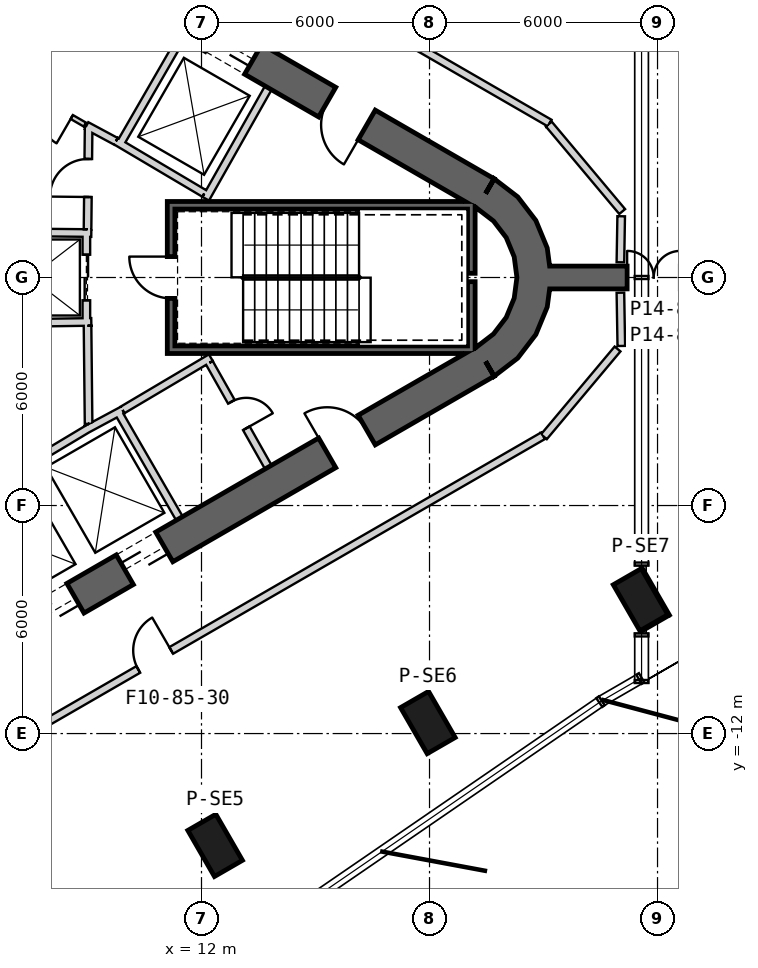
"""IFC4 building model, lengths in metres.
Left out: names, types, materials, properties, quantities, classifications, styles, units other than length and angle.
Written with IfcOpenShell. Run it as: python <this file> out.ifc"""

import sys

from ifc_helpers import new_model, si_unit, direction, frame, frame_2d, origin, origin_2d, place, context, subcontext, project, spatial, polyline, rectangle, outline, extrude, element, fill, save


model = new_model("IFC4")
c1 = context("Model", 3, precision=1e-05, world=origin(), true_north=direction((0.0, 1.0)))
c2 = subcontext(c1, "Body", "Model", "MODEL_VIEW")
j1 = project(units=[si_unit("LENGTHUNIT", "METRE"), si_unit("PLANEANGLEUNIT", "RADIAN")], contexts=[c1])
p1 = place(None, origin())
s1 = spatial("IfcSite", under=j1, at=p1, CompositionType="ELEMENT")
p2 = place(p1, origin())
s2 = spatial("IfcBuilding", under=s1, at=p2, CompositionType="ELEMENT")
p3 = place(p2, frame((0.0, 0.0, 368.9)))
s3 = spatial("IfcBuildingStorey", under=s2, at=p3, CompositionType="ELEMENT", Elevation=368.9)
for number, where, z_axis, x_axis in (
    (1, (12.359, -14.942, 0.0), (0.0, 0.0, 1.0), (0.5, -0.866, 0.0)),
    (2, (17.957, -11.71, 0.0), (0.0, 0.0, 1.0), (0.5, -0.866, 0.0)),
    (3, (23.555, -8.479, 0.0), (0.0, 0.0, 1.0), (0.5, -0.866, 0.0)),
):
    element("IfcColumn", number, at=place(p3, frame(where, z_axis=z_axis, x_axis=x_axis)), inside=s3, PredefinedType="COLUMN", context=c2, shape_type="SweptSolid", body=[
        extrude(rectangle(XDim=1.4, YDim=0.85, at=origin_2d()), origin(), (0.0, 0.0, 1.0), 3.9),
    ])
p4 = place(p3, frame((19.475, 2.208, 0.0), z_axis=(0.0, 0.0, 1.0), x_axis=(-0.866028369851, 0.499994862586, 0.0)))
e4 = element("IfcWall", 4, at=p4, inside=s3, PredefinedType="SHEAR", context=c2, shape_type="SweptSolid", body=[
    extrude(rectangle(XDim=31.523, YDim=0.9, at=frame_2d((15.762, 0.0))), origin(), (0.0, 0.0, 1.0), 3.9),
])
p5 = place(p4, frame((7.062, 0.0, 0.0)))
e5 = element("IfcOpeningElement", 5, at=p5, cuts=e4, PredefinedType="OPENING", context=c2, shape_type="SweptSolid", body=[
    extrude(rectangle(XDim=1.2, YDim=2.4, at=frame_2d((0.6, 1.2))), frame((0.0, 0.46, 0.0), z_axis=(0.0, -1.0, 0.0), x_axis=(1.0, 0.0, 0.0)), (0.0, 0.0, 1.0), 0.92),
])
p6 = place(p4, frame((3.612, 0.0, 0.0)))
e6 = element("IfcOpeningElement", 6, at=p6, cuts=e4, PredefinedType="OPENING", context=c2, shape_type="SweptSolid", body=[
    extrude(rectangle(XDim=1.2, YDim=2.4, at=frame_2d((0.6, 1.2))), frame((0.0, 0.46, 0.0), z_axis=(0.0, -1.0, 0.0), x_axis=(1.0, 0.0, 0.0)), (0.0, 0.0, 1.0), 0.92),
])
p7 = place(p4, frame((26.712, 0.0, 0.0)))
e7 = element("IfcOpeningElement", 7, at=p7, cuts=e4, PredefinedType="OPENING", context=c2, shape_type="SweptSolid", body=[
    extrude(rectangle(XDim=1.2, YDim=2.4, at=frame_2d((0.6, 1.2))), frame((0.0, 0.46, 0.0), z_axis=(0.0, -1.0, 0.0), x_axis=(1.0, 0.0, 0.0)), (0.0, 0.0, 1.0), 0.92),
])
p8 = place(p3, frame((-7.825, -17.97, 0.0), z_axis=(0.0, 0.0, 1.0), x_axis=(0.866028369851, 0.499994862586, 0.0)))
e8 = element("IfcWall", 8, at=p8, inside=s3, PredefinedType="SHEAR", context=c2, shape_type="SweptSolid", body=[
    extrude(rectangle(XDim=31.523, YDim=0.9, at=frame_2d((15.762, 0.0))), origin(), (0.0, 0.0, 1.0), 3.9),
])
p9 = place(p8, frame((17.862, 0.0, 0.0)))
e9 = element("IfcOpeningElement", 9, at=p9, cuts=e8, PredefinedType="OPENING", context=c2, shape_type="SweptSolid", body=[
    extrude(rectangle(XDim=1.2, YDim=2.4, at=frame_2d((0.6, 1.2))), frame((0.0, 0.46, 0.0), z_axis=(0.0, -1.0, 0.0), x_axis=(1.0, 0.0, 0.0)), (0.0, 0.0, 1.0), 0.92),
])
p10 = place(p8, frame((20.562, 0.0, 0.0)))
e10 = element("IfcOpeningElement", 10, at=p10, cuts=e8, PredefinedType="OPENING", context=c2, shape_type="SweptSolid", body=[
    extrude(rectangle(XDim=1.2, YDim=2.4, at=frame_2d((0.6, 1.2))), frame((0.0, 0.46, 0.0), z_axis=(0.0, -1.0, 0.0), x_axis=(1.0, 0.0, 0.0)), (0.0, 0.0, 1.0), 0.92),
])
p11 = place(p8, frame((26.712, 0.0, 0.0)))
e11 = element("IfcOpeningElement", 11, at=p11, cuts=e8, PredefinedType="OPENING", context=c2, shape_type="SweptSolid", body=[
    extrude(rectangle(XDim=1.2, YDim=2.4, at=frame_2d((0.6, 1.2))), frame((0.0, 0.46, 0.0), z_axis=(0.0, -1.0, 0.0), x_axis=(1.0, 0.0, 0.0)), (0.0, 0.0, 1.0), 0.92),
])
p12 = place(p8, frame((3.612, 0.0, 0.0)))
e12 = element("IfcOpeningElement", 12, at=p12, cuts=e8, PredefinedType="OPENING", context=c2, shape_type="SweptSolid", body=[
    extrude(rectangle(XDim=1.2, YDim=2.4, at=frame_2d((0.6, 1.2))), frame((0.0, 0.46, 0.0), z_axis=(0.0, -1.0, 0.0), x_axis=(1.0, 0.0, 0.0)), (0.0, 0.0, 1.0), 0.92),
])
p13 = place(p3, origin())
e13 = element("IfcWall", 13, at=p13, inside=s3, PredefinedType="SHEAR", context=c2, shape_type="SweptSolid", body=[
    extrude(outline(polyline([(19.7, -2.598), (20.321, -2.121), (20.798, -1.5), (21.098, -0.777), (21.2, 0.0), (21.098, 0.777), (20.798, 1.5), (20.321, 2.121), (19.7, 2.598), (19.25, 1.819), (19.685, 1.485), (20.019, 1.05), (20.229, 0.543), (20.3, 0.0), (20.229, -0.543), (20.019, -1.05), (19.685, -1.485), (19.25, -1.819), (19.7, -2.598)])), origin(), (0.0, 0.0, 1.0), 3.9),
])
p14 = place(p3, frame((21.15, 0.0, 0.0), z_axis=(0.0, 0.0, 1.0), x_axis=(1.0, 0.0, 0.0)))
e14 = element("IfcWall", 14, at=p14, inside=s3, PredefinedType="SHEAR", context=c2, shape_type="SweptSolid", body=[
    extrude(rectangle(XDim=6.921, YDim=0.6, at=frame_2d((3.461, 0.0))), origin(), (0.0, 0.0, 1.0), 3.9),
])
p15 = place(p14, frame((1.7, 0.0, 0.0)))
e15 = element("IfcOpeningElement", 15, at=p15, cuts=e14, PredefinedType="OPENING", context=c2, shape_type="SweptSolid", body=[
    extrude(rectangle(XDim=1.4, YDim=2.4, at=frame_2d((0.7, 1.2))), frame((0.0, 0.31, 0.0), z_axis=(0.0, -1.0, 0.0), x_axis=(1.0, 0.0, 0.0)), (0.0, 0.0, 1.0), 0.62),
])
p16 = place(p3, frame((23.569, -7.593, 0.0), z_axis=(0.0, 0.0, 1.0), x_axis=(0.499991248344, -0.866030456496, 0.0)))
e16 = element("IfcWall", 16, at=p16, inside=s3, PredefinedType="SOLIDWALL", context=c2, shape_type="SweptSolid", body=[
    extrude(rectangle(XDim=1.52, YDim=0.06, at=frame_2d((0.76, 0.0))), origin(), (0.0, 0.0, 1.0), 2.61),
])
p17 = place(p3, frame((23.552, -9.323, 0.0), z_axis=(0.0, 0.0, 1.0), x_axis=(0.866061263272, 0.499937884402, 0.0)))
e17 = element("IfcWall", 17, at=p17, inside=s3, PredefinedType="SOLIDWALL", context=c2, shape_type="SweptSolid", body=[
    extrude(rectangle(XDim=0.85, YDim=0.06, at=frame_2d((0.425, 0.0))), origin(), (0.0, 0.0, 1.0), 3.21),
])
p18 = place(p3, frame((9.847, 3.495, 0.0), z_axis=(0.0, 0.0, 1.0), x_axis=(0.499984717929, 0.866034226713, 0.0)))
e18 = element("IfcWall", 18, at=p18, inside=s3, PredefinedType="PLUMBINGWALL", context=c2, shape_type="SweptSolid", body=[
    extrude(rectangle(XDim=3.25, YDim=0.2, at=frame_2d((1.625, 0.0))), origin(), (0.0, 0.0, 1.0), 3.6),
])
p19 = place(p3, frame((12.11, 2.073, 0.0), z_axis=(0.0, 0.0, 1.0), x_axis=(0.49196600604, 0.870614408852, 0.0)))
e19 = element("IfcWall", 19, at=p19, inside=s3, PredefinedType="PLUMBINGWALL", context=c2, shape_type="SweptSolid", body=[
    extrude(rectangle(XDim=3.35, YDim=0.2, at=frame_2d((1.675, 0.0))), origin(), (0.0, 0.0, 1.0), 3.6),
])
p20 = place(p3, frame((12.073, 2.211, 0.0), z_axis=(0.0, 0.0, 1.0), x_axis=(-0.860414880418, 0.509594185166, 0.0)))
e20 = element("IfcWall", 20, at=p20, inside=s3, PredefinedType="PLUMBINGWALL", context=c2, shape_type="SweptSolid", body=[
    extrude(rectangle(XDim=2.7, YDim=0.2, at=frame_2d((1.35, 0.0))), origin(), (0.0, 0.0, 1.0), 3.6),
])
p21 = place(p3, frame((9.795, -3.525, 0.0), z_axis=(0.0, 0.0, 1.0), x_axis=(0.499984717929, -0.866034226713, 0.0)))
e21 = element("IfcWall", 21, at=p21, inside=s3, PredefinedType="PLUMBINGWALL", context=c2, shape_type="SweptSolid", body=[
    extrude(rectangle(XDim=3.25, YDim=0.2, at=frame_2d((1.625, 0.0))), origin(), (0.0, 0.0, 1.0), 3.6),
])
p22 = place(p3, frame((8.974, -3.999, 0.0), z_axis=(0.0, 0.0, 1.0), x_axis=(0.880907015104, 0.473289373154, 0.0)))
e22 = element("IfcWall", 22, at=p22, inside=s3, PredefinedType="PLUMBINGWALL", context=c2, shape_type="SweptSolid", body=[
    extrude(rectangle(XDim=1.078, YDim=0.2, at=frame_2d((0.539, 0.0))), origin(), (0.0, 0.0, 1.0), 3.6),
])
p23 = place(p3, frame((7.493, -4.878, 0.0), z_axis=(0.0, 0.0, 1.0), x_axis=(0.859981807212, 0.510324691999, 0.0)))
e23 = element("IfcWall", 23, at=p23, inside=s3, PredefinedType="PLUMBINGWALL", context=c2, shape_type="SweptSolid", body=[
    extrude(rectangle(XDim=1.845, YDim=0.2, at=frame_2d((0.922, 0.0))), origin(), (0.0, 0.0, 1.0), 3.6),
])
p24 = place(p3, frame((19.2, 1.9, -0.3), z_axis=(0.0, 0.0, 1.0), x_axis=(-1.0, 0.0, 0.0)))
e24 = element("IfcWall", 24, at=p24, inside=s3, PredefinedType="SHEAR", context=c2, shape_type="SweptSolid", body=[
    extrude(rectangle(XDim=8.1, YDim=0.2, at=frame_2d((4.05, 0.0))), origin(), (0.0, 0.0, 1.0), 3.9),
])
p25 = place(p3, frame((19.1, -2.0, -0.3), z_axis=(0.0, 0.0, 1.0), x_axis=(0.0, 1.0, 0.0)))
e25 = element("IfcWall", 25, at=p25, inside=s3, PredefinedType="SHEAR", context=c2, shape_type="SweptSolid", body=[
    extrude(rectangle(XDim=1.89, YDim=0.2, at=frame_2d((0.945, 0.0))), origin(), (0.0, 0.0, 1.0), 3.9),
])
p26 = place(p3, frame((19.1, 0.11, -0.3), z_axis=(0.0, 0.0, 1.0), x_axis=(0.0, 1.0, 0.0)))
e26 = element("IfcWall", 26, at=p26, inside=s3, PredefinedType="SHEAR", context=c2, shape_type="SweptSolid", body=[
    extrude(rectangle(XDim=1.69, YDim=0.2, at=frame_2d((0.845, 0.0))), origin(), (0.0, 0.0, 1.0), 3.9),
])
p27 = place(p3, frame((11.1, -1.9, -0.3), z_axis=(0.0, 0.0, 1.0), x_axis=(1.0, 0.0, 0.0)))
e27 = element("IfcWall", 27, at=p27, inside=s3, PredefinedType="SHEAR", context=c2, shape_type="SweptSolid", body=[
    extrude(rectangle(XDim=7.9, YDim=0.2, at=frame_2d((3.95, 0.0))), origin(), (0.0, 0.0, 1.0), 3.9),
])
p28 = place(p3, frame((11.2, -1.8, -0.3), z_axis=(0.0, 0.0, 1.0), x_axis=(0.0, 1.0, 0.0)))
e28 = element("IfcWall", 28, at=p28, inside=s3, PredefinedType="SHEAR", context=c2, shape_type="SweptSolid", body=[
    extrude(rectangle(XDim=3.6, YDim=0.2, at=frame_2d((1.8, 0.0))), origin(), (0.0, 0.0, 1.0), 3.9),
])
p29 = place(p28, frame((1.25, 0.0, 0.3)))
e29 = element("IfcOpeningElement", 29, at=p29, cuts=e28, PredefinedType="OPENING", context=c2, shape_type="SweptSolid", body=[
    extrude(rectangle(XDim=1.1, YDim=2.1, at=frame_2d((0.55, 1.05))), frame((0.0, 0.11, 0.0), z_axis=(0.0, -1.0, 0.0), x_axis=(1.0, 0.0, 0.0)), (0.0, 0.0, 1.0), 0.22),
])
p30 = place(p3, frame((8.97, 1.2, 0.0), z_axis=(0.0, 0.0, 1.0), x_axis=(0.0, -1.0, 0.0)))
e30 = element("IfcWall", 30, at=p30, inside=s3, PredefinedType="PLUMBINGWALL", context=c2, shape_type="SweptSolid", body=[
    extrude(rectangle(XDim=2.4, YDim=0.2, at=frame_2d((1.2, 0.0))), origin(), (0.0, 0.0, 1.0), 3.6),
])
p31 = place(p30, frame((0.6, 0.0, 0.0)))
e31 = element("IfcOpeningElement", 31, at=p31, cuts=e30, PredefinedType="OPENING", context=c2, shape_type="SweptSolid", body=[
    extrude(rectangle(XDim=1.2, YDim=2.4, at=frame_2d((0.6, 1.2))), frame((0.0, 0.11, 0.0), z_axis=(0.0, -1.0, 0.0), x_axis=(1.0, 0.0, 0.0)), (0.0, 0.0, 1.0), 0.22),
])
p32 = place(p3, frame((6.0, 1.2, 0.0), z_axis=(0.0, 0.0, 1.0), x_axis=(0.999949988, -0.010001074852, 0.0)))
e32 = element("IfcWall", 32, at=p32, inside=s3, PredefinedType="PLUMBINGWALL", context=c2, shape_type="SweptSolid", body=[
    extrude(rectangle(XDim=3.1, YDim=0.2, at=frame_2d((1.55, 0.0))), origin(), (0.0, 0.0, 1.0), 3.6),
])
p33 = place(p3, frame((5.9, -1.201, 0.0), z_axis=(0.0, 0.0, 1.0), x_axis=(0.999950064753, 0.009993397809, 0.0)))
e33 = element("IfcWall", 33, at=p33, inside=s3, PredefinedType="PLUMBINGWALL", context=c2, shape_type="SweptSolid", body=[
    extrude(rectangle(XDim=3.2, YDim=0.2, at=frame_2d((1.6, 0.0))), origin(), (0.0, 0.0, 1.0), 3.6),
])
p34 = place(p3, frame((8.974, 3.999, 0.0), z_axis=(0.0, 0.0, 1.0), x_axis=(0.880917147855, -0.473270513147, 0.0)))
e34 = element("IfcWall", 34, at=p34, inside=s3, PredefinedType="PARTITIONING", context=c2, shape_type="SweptSolid", body=[
    extrude(rectangle(XDim=0.878, YDim=0.2, at=frame_2d((0.439, 0.0))), origin(), (0.0, 0.0, 1.0), 3.6),
])
p35 = place(p3, frame((8.931, 4.025, 0.0), z_axis=(0.0, 0.0, 1.0), x_axis=(-0.862666884027, 0.505772525157, 0.0)))
e35 = element("IfcWall", 35, at=p35, inside=s3, PredefinedType="PLUMBINGWALL", context=c2, shape_type="SweptSolid", body=[
    extrude(rectangle(XDim=4.372, YDim=0.15, at=frame_2d((2.186, 0.0))), origin(), (0.0, 0.0, 1.0), 3.6),
])
p36 = place(p3, frame((12.245, -2.109, 0.0), z_axis=(0.0, 0.0, 1.0), x_axis=(-0.860414880418, -0.509594185166, 0.0)))
e36 = element("IfcWall", 36, at=p36, inside=s3, PredefinedType="PARTITIONING", context=c2, shape_type="SweptSolid", body=[
    extrude(rectangle(XDim=2.7, YDim=0.2, at=frame_2d((1.35, 0.0))), origin(), (0.0, 0.0, 1.0), 3.6),
])
p37 = place(p3, frame((13.758, -4.99, 0.0), z_axis=(0.0, 0.0, 1.0), x_axis=(-0.491993409184, 0.87059892334, 0.0)))
e37 = element("IfcWall", 37, at=p37, inside=s3, PredefinedType="PARTITIONING", context=c2, shape_type="SweptSolid", body=[
    extrude(rectangle(XDim=3.15, YDim=0.2, at=frame_2d((1.575, 0.0))), origin(), (0.0, 0.0, 1.0), 3.6),
])
p38 = place(p37, frame((1.175, 0.0, 0.0)))
e38 = element("IfcOpeningElement", 38, at=p38, cuts=e37, PredefinedType="OPENING", context=c2, shape_type="SweptSolid", body=[
    extrude(rectangle(XDim=0.8, YDim=2.1, at=frame_2d((0.4, 1.05))), frame((0.0, 0.11, 0.0), z_axis=(0.0, -1.0, 0.0), x_axis=(1.0, 0.0, 0.0)), (0.0, 0.0, 1.0), 0.22),
])
p39 = place(p3, frame((9.001, 1.27, 0.0), z_axis=(0.0, 0.0, 1.0), x_axis=(0.01074821465, 0.999942236273, 0.0)))
e39 = element("IfcWall", 39, at=p39, inside=s3, PredefinedType="PARTITIONING", context=c2, shape_type="SweptSolid", body=[
    extrude(rectangle(XDim=2.726, YDim=0.2, at=frame_2d((1.363, 0.0))), origin(), (0.0, 0.0, 1.0), 3.6),
])
p40 = place(p3, frame((9.029, -3.851, 0.0), z_axis=(0.0, 0.0, 1.0), x_axis=(-0.010783593937, 0.99994185536, 0.0)))
e40 = element("IfcWall", 40, at=p40, inside=s3, PredefinedType="PARTITIONING", context=c2, shape_type="SweptSolid", body=[
    extrude(rectangle(XDim=2.581, YDim=0.2, at=frame_2d((1.291, 0.0))), origin(), (0.0, 0.0, 1.0), 3.6),
])
p41 = place(p40, frame((0.791, 0.0, 0.0)))
e41 = element("IfcOpeningElement", 41, at=p41, cuts=e40, PredefinedType="OPENING", context=c2, shape_type="SweptSolid", body=[
    extrude(rectangle(XDim=1.0, YDim=2.1, at=frame_2d((0.5, 1.05))), frame((0.0, 0.11, 0.0), z_axis=(0.0, -1.0, 0.0), x_axis=(1.0, 0.0, 0.0)), (0.0, 0.0, 1.0), 0.22),
])
p42 = place(p3, frame((21.518, 4.551, 0.0), z_axis=(0.0, 0.0, 1.0), x_axis=(-0.866027594353, 0.499996205806, 0.0)))
e42 = element("IfcWall", 42, at=p42, inside=s3, PredefinedType="PARTITIONING", context=c2, shape_type="SweptSolid", body=[
    extrude(rectangle(XDim=8.775, YDim=0.12, at=frame_2d((4.387, 0.0))), origin(), (0.0, 0.0, 1.0), 2.97),
])
p43 = place(p42, frame((3.86, 0.0, 0.0)))
e43 = element("IfcOpeningElement", 43, at=p43, cuts=e42, PredefinedType="OPENING", context=c2, shape_type="SweptSolid", body=[
    extrude(rectangle(XDim=1.0, YDim=2.1, at=frame_2d((0.5, 1.05))), frame((0.0, 0.07, 0.0), z_axis=(0.0, -1.0, 0.0), x_axis=(1.0, 0.0, 0.0)), (0.0, 0.0, 1.0), 0.14),
])
p44 = place(p3, frame((23.52, 2.133, 0.0), z_axis=(0.0, 0.0, 1.0), x_axis=(-0.642792120468, 0.766040658101, 0.0)))
e44 = element("IfcWall", 44, at=p44, inside=s3, PredefinedType="PARTITIONING", context=c2, shape_type="SweptSolid", body=[
    extrude(rectangle(XDim=3.136, YDim=0.12, at=frame_2d((1.568, 0.0))), origin(), (0.0, 0.0, 1.0), 2.58),
])
p45 = place(p3, frame((-6.852, -20.93, 0.0), z_axis=(0.0, 0.0, 1.0), x_axis=(0.866025322732, 0.500000140387, 0.0)))
e45 = element("IfcWall", 45, at=p45, inside=s3, PredefinedType="PARTITIONING", context=c2, shape_type="SweptSolid", body=[
    extrude(rectangle(XDim=22.857, YDim=0.2, at=frame_2d((11.428, 0.0))), origin(), (0.0, 0.0, 1.0), 2.97),
])
p46 = place(p45, frame((10.9, 0.0, 0.0)))
e46 = element("IfcOpeningElement", 46, at=p46, cuts=e45, PredefinedType="OPENING", context=c2, shape_type="SweptSolid", body=[
    extrude(rectangle(XDim=1.0, YDim=2.1, at=frame_2d((0.5, 1.05))), frame((0.0, 0.11, 0.0), z_axis=(0.0, -1.0, 0.0), x_axis=(1.0, 0.0, 0.0)), (0.0, 0.0, 1.0), 0.22),
])
p47 = place(p3, frame((21.427, -4.627, 0.0), z_axis=(0.0, 0.0, 1.0), x_axis=(0.64281389261, 0.766022388359, 0.0)))
e47 = element("IfcWall", 47, at=p47, inside=s3, PredefinedType="PARTITIONING", context=c2, shape_type="SweptSolid", body=[
    extrude(rectangle(XDim=3.256, YDim=0.12, at=frame_2d((1.628, 0.0))), origin(), (0.0, 0.0, 1.0), 2.58),
])
p48 = place(p3, frame((12.977, -9.482, 0.0), z_axis=(0.0, 0.0, 1.0), x_axis=(0.866030756363, 0.499990728947, 0.0)))
e48 = element("IfcWall", 48, at=p48, inside=s3, PredefinedType="PARTITIONING", context=c2, shape_type="SweptSolid", body=[
    extrude(rectangle(XDim=9.742, YDim=0.12, at=frame_2d((4.871, 0.0))), origin(), (0.0, 0.0, 1.0), 2.97),
])
p49 = place(p48, frame((4.332, 0.0, 0.0)))
e49 = element("IfcOpeningElement", 49, at=p49, cuts=e48, PredefinedType="OPENING", context=c2, shape_type="SweptSolid", body=[
    extrude(rectangle(XDim=1.0, YDim=2.1, at=frame_2d((0.5, 1.05))), frame((0.0, 0.07, 0.0), z_axis=(0.0, -1.0, 0.0), x_axis=(1.0, 0.0, 0.0)), (0.0, 0.0, 1.0), 0.14),
])
p50 = place(p3, frame((16.726, -15.123, 0.0), z_axis=(0.0, 0.0, 1.0), x_axis=(-0.565749931425, 0.824576870336, 0.0)))
e50 = element("IfcWall", 50, at=p50, inside=s3, PredefinedType="PARTITIONING", context=c2, shape_type="SweptSolid", body=[
    extrude(rectangle(XDim=6.68, YDim=0.2, at=frame_2d((3.34, 0.0))), origin(), (0.0, 0.0, 1.0), 3.6),
])
p51 = place(p29, origin())
e51 = element("IfcDoor", 51, at=p51, inside=s3, OperationType="SINGLE_SWING_RIGHT", PredefinedType="USERDEFINED", context=c2, shape_type="SweptSolid", body=[
    extrude(rectangle(XDim=1.1, YDim=2.1, at=frame_2d((0.55, 1.05))), frame((0.0, 0.025, 0.0), z_axis=(0.0, -1.0, 0.0), x_axis=(1.0, 0.0, 0.0)), (0.0, 0.0, 1.0), 0.05),
])
fill(e29, e51)
p52 = place(p41, origin())
e52 = element("IfcDoor", 52, at=p52, inside=s3, OperationType="SINGLE_SWING_RIGHT", PredefinedType="USERDEFINED", context=c2, shape_type="SweptSolid", body=[
    extrude(rectangle(XDim=1.0, YDim=2.1, at=frame_2d((0.5, 1.05))), frame((0.0, 0.025, 0.0), z_axis=(0.0, -1.0, 0.0), x_axis=(1.0, 0.0, 0.0)), (0.0, 0.0, 1.0), 0.05),
])
fill(e41, e52)
p53 = place(p31, origin())
e53 = element("IfcDoor", 53, at=p53, inside=s3, OperationType="SLIDING_TO_LEFT", PredefinedType="USERDEFINED", context=c2, shape_type="SweptSolid", body=[
    extrude(rectangle(XDim=1.2, YDim=2.4, at=frame_2d((0.6, 1.2))), frame((0.0, 0.025, 0.0), z_axis=(0.0, -1.0, 0.0), x_axis=(1.0, 0.0, 0.0)), (0.0, 0.0, 1.0), 0.05),
])
fill(e31, e53)
p54 = place(p38, origin())
e54 = element("IfcDoor", 54, at=p54, inside=s3, OperationType="SINGLE_SWING_LEFT", PredefinedType="USERDEFINED", context=c2, shape_type="SweptSolid", body=[
    extrude(rectangle(XDim=0.8, YDim=2.1, at=frame_2d((0.4, 1.05))), frame((0.0, 0.025, 0.0), z_axis=(0.0, -1.0, 0.0), x_axis=(1.0, 0.0, 0.0)), (0.0, 0.0, 1.0), 0.05),
])
fill(e38, e54)
p55 = place(p49, origin())
e55 = element("IfcDoor", 55, at=p55, inside=s3, OperationType="SINGLE_SWING_LEFT", PredefinedType="NOTDEFINED", context=c2, shape_type="SweptSolid", body=[
    extrude(rectangle(XDim=1.0, YDim=2.1, at=frame_2d((0.5, 1.05))), frame((0.0, 0.025, 0.0), z_axis=(0.0, -1.0, 0.0), x_axis=(1.0, 0.0, 0.0)), (0.0, 0.0, 1.0), 0.05),
])
fill(e49, e55)
p56 = place(p5, origin())
e56 = element("IfcDoor", 56, at=p56, inside=s3, OperationType="SLIDING_TO_LEFT", PredefinedType="USERDEFINED", context=c2, shape_type="SweptSolid", body=[
    extrude(rectangle(XDim=1.2, YDim=2.4, at=frame_2d((0.6, 1.2))), frame((0.0, 0.025, 0.0), z_axis=(0.0, -1.0, 0.0), x_axis=(1.0, 0.0, 0.0)), (0.0, 0.0, 1.0), 0.05),
])
fill(e5, e56)
p57 = place(p9, origin())
e57 = element("IfcDoor", 57, at=p57, inside=s3, OperationType="SLIDING_TO_LEFT", PredefinedType="USERDEFINED", context=c2, shape_type="SweptSolid", body=[
    extrude(rectangle(XDim=1.2, YDim=2.4, at=frame_2d((0.6, 1.2))), frame((0.0, 0.025, 0.0), z_axis=(0.0, -1.0, 0.0), x_axis=(1.0, 0.0, 0.0)), (0.0, 0.0, 1.0), 0.05),
])
fill(e9, e57)
p58 = place(p10, origin())
e58 = element("IfcDoor", 58, at=p58, inside=s3, OperationType="SLIDING_TO_LEFT", PredefinedType="USERDEFINED", context=c2, shape_type="SweptSolid", body=[
    extrude(rectangle(XDim=1.2, YDim=2.4, at=frame_2d((0.6, 1.2))), frame((0.0, 0.025, 0.0), z_axis=(0.0, -1.0, 0.0), x_axis=(1.0, 0.0, 0.0)), (0.0, 0.0, 1.0), 0.05),
])
fill(e10, e58)
p59 = place(p11, origin())
e59 = element("IfcDoor", 59, at=p59, inside=s3, OperationType="SINGLE_SWING_LEFT", PredefinedType="USERDEFINED", context=c2, shape_type="SweptSolid", body=[
    extrude(rectangle(XDim=1.2, YDim=2.4, at=frame_2d((0.6, 1.2))), frame((0.0, 0.025, 0.0), z_axis=(0.0, -1.0, 0.0), x_axis=(1.0, 0.0, 0.0)), (0.0, 0.0, 1.0), 0.05),
])
fill(e11, e59)
p60 = place(p6, origin())
e60 = element("IfcDoor", 60, at=p60, inside=s3, OperationType="SINGLE_SWING_LEFT", PredefinedType="USERDEFINED", context=c2, shape_type="SweptSolid", body=[
    extrude(rectangle(XDim=1.2, YDim=2.4, at=frame_2d((0.6, 1.2))), frame((0.0, 0.025, 0.0), z_axis=(0.0, -1.0, 0.0), x_axis=(1.0, 0.0, 0.0)), (0.0, 0.0, 1.0), 0.05),
])
fill(e6, e60)
p61 = place(p15, origin())
e61 = element("IfcDoor", 61, at=p61, inside=s3, OperationType="DOUBLE_DOOR_SINGLE_SWING", PredefinedType="NOTDEFINED", context=c2, shape_type="SweptSolid", body=[
    extrude(rectangle(XDim=1.4, YDim=2.4, at=frame_2d((0.7, 1.2))), frame((0.0, 0.025, 0.0), z_axis=(0.0, -1.0, 0.0), x_axis=(1.0, 0.0, 0.0)), (0.0, 0.0, 1.0), 0.05),
])
fill(e15, e61)
save(model, sys.argv[1])
